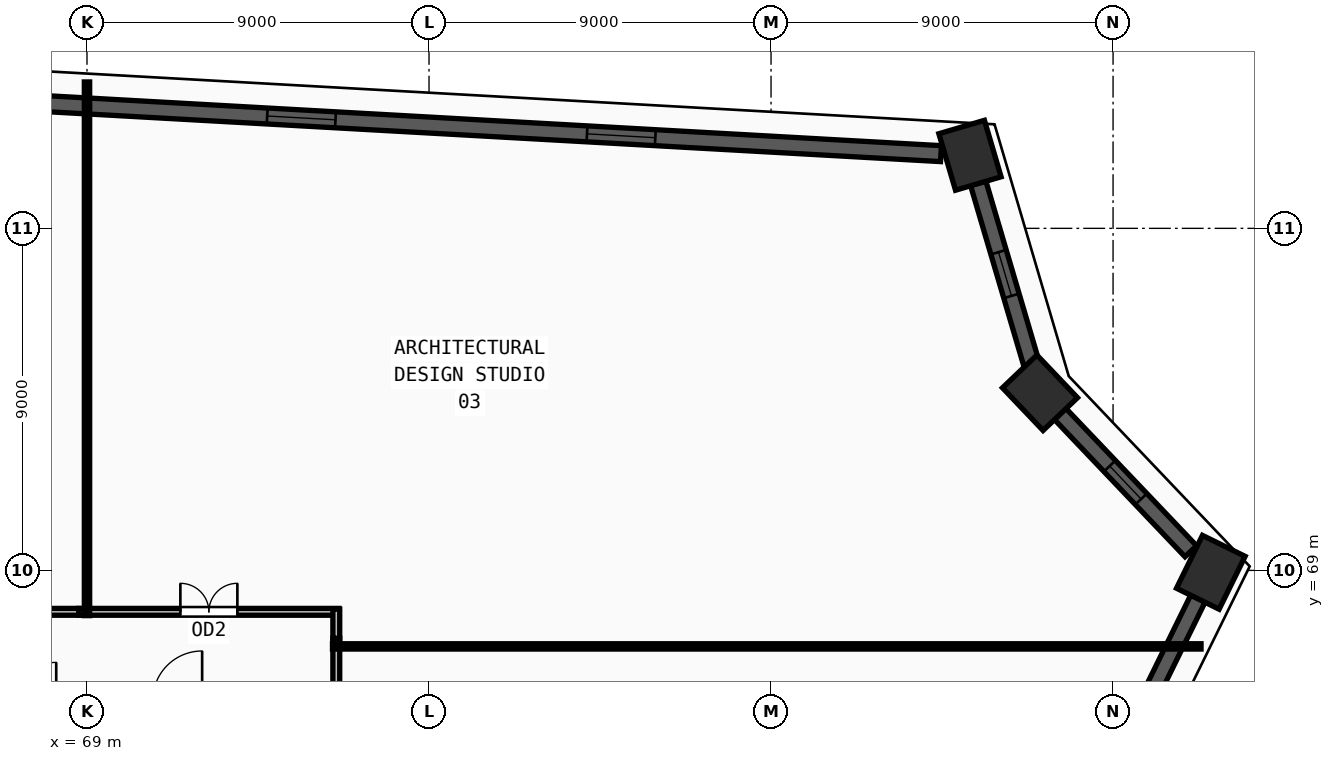
"""IFC4 building model, lengths in metres.
Left out: names, types, materials, properties, quantities, classifications, styles, units other than length and angle.
Written with IfcOpenShell. Run it as: python <this file> out.ifc"""

import sys

from ifc_helpers import new_model, si_unit, direction, frame, frame_2d, origin, origin_2d, place, context, subcontext, project, spatial, rectangle, extrude, source, transform, mapped, element, fill, save


model = new_model("IFC4")
c1 = context("Model", 3, precision=1e-05, world=origin(), true_north=direction((0.0, 1.0)))
c2 = subcontext(c1, "Body", "Model", "MODEL_VIEW")
j1 = project(units=[si_unit("LENGTHUNIT", "METRE"), si_unit("PLANEANGLEUNIT", "RADIAN")], contexts=[c1])
p1 = place(None, origin())
s1 = spatial("IfcSite", under=j1, at=p1, CompositionType="ELEMENT")
p2 = place(p1, origin())
s2 = spatial("IfcBuilding", under=s1, at=p2, CompositionType="ELEMENT")
p3 = place(p2, frame((0.0, 0.0, 51.75)))
s3 = spatial("IfcBuildingStorey", under=s2, at=p3, CompositionType="ELEMENT", Elevation=51.75)
m1 = source(origin(), c2, "Body", "SweptSolid", [
    extrude(rectangle(XDim=1.55, YDim=1.25, at=origin_2d()), origin(), (0.0, 0.0, 1.0), 3.75),
])
for number, where, z_axis, x_axis in (
    (1, (92.235, 79.923, 0.0), (0.0, 0.0, 1.0), (-0.283, 0.959, 0.0)),
    (2, (94.077, 73.674, 0.0), (0.0, 0.0, 1.0), (-0.689, 0.724, 0.0)),
    (3, (98.572, 68.95, 0.0), (0.0, 0.0, 1.0), (0.441, 0.897, 0.0)),
):
    element("IfcColumn", number, at=place(p3, frame(where, z_axis=z_axis, x_axis=x_axis)), inside=s3, PredefinedType="COLUMN", context=c2, shape_type="MappedRepresentation", body=[
        mapped(m1, transform((0.0, 0.0, 0.0), x_axis=(1.0, 0.0, 0.0), y_axis=(0.0, 1.0, 0.0), z_axis=(0.0, 0.0, 1.0), scale=1.0)),
    ])
p4 = place(p3, frame((85.967, 43.301, 0.0), z_axis=(0.0, 0.0, 1.0), x_axis=(0.441079786623, 0.897467894597, 0.0)))
e4 = element("IfcWall", 4, at=p4, inside=s3, PredefinedType="SOLIDWALL", context=c2, shape_type="SweptSolid", body=[
    extrude(rectangle(XDim=27.814, YDim=0.42, at=frame_2d((13.907, 0.0))), origin(), (0.0, 0.0, 1.0), 3.57),
])
m2 = source(origin(), c2, "Body", "SweptSolid", [
    extrude(rectangle(XDim=1.8, YDim=1.95, at=frame_2d((0.9, 0.975))), frame((0.0, 0.22, 0.0), z_axis=(0.0, -1.0, 0.0), x_axis=(1.0, 0.0, 0.0)), (0.0, 0.0, 1.0), 0.44),
])
p5 = place(p4, frame((6.053, 0.0, 0.55)))
e5 = element("IfcOpeningElement", 5, at=p5, cuts=e4, PredefinedType="OPENING", context=c2, shape_type="MappedRepresentation", body=[
    mapped(m2, transform((0.0, 0.0, 0.0), x_axis=(1.0, 0.0, 0.0), y_axis=(0.0, 1.0, 0.0), z_axis=(0.0, 0.0, 1.0), scale=1.0)),
])
p6 = place(p4, frame((14.557, 0.0, 0.55)))
e6 = element("IfcOpeningElement", 6, at=p6, cuts=e4, PredefinedType="OPENING", context=c2, shape_type="MappedRepresentation", body=[
    mapped(m2, transform((0.0, 0.0, 0.0), x_axis=(1.0, 0.0, 0.0), y_axis=(0.0, 1.0, 0.0), z_axis=(0.0, 0.0, 1.0), scale=1.0)),
])
p7 = place(p4, frame((19.11, 0.0, 0.55)))
e7 = element("IfcOpeningElement", 7, at=p7, cuts=e4, PredefinedType="OPENING", context=c2, shape_type="MappedRepresentation", body=[
    mapped(m2, transform((0.0, 0.0, 0.0), x_axis=(1.0, 0.0, 0.0), y_axis=(0.0, 1.0, 0.0), z_axis=(0.0, 0.0, 1.0), scale=1.0)),
])
p8 = place(p3, frame((98.045, 69.504, 0.0), z_axis=(0.0, 0.0, 1.0), x_axis=(-0.689330241698, 0.724447249895, 0.0)))
e8 = element("IfcWall", 8, at=p8, inside=s3, PredefinedType="SOLIDWALL", context=c2, shape_type="SweptSolid", body=[
    extrude(rectangle(XDim=4.992, YDim=0.42, at=frame_2d((2.496, 0.0))), origin(), (0.0, 0.0, 1.0), 3.57),
])
m3 = source(origin(), c2, "Body", "SweptSolid", [
    extrude(rectangle(XDim=1.2, YDim=1.9, at=frame_2d((0.6, 0.95))), frame((0.0, 0.22, 0.0), z_axis=(0.0, -1.0, 0.0), x_axis=(1.0, 0.0, 0.0)), (0.0, 0.0, 1.0), 0.44),
])
p9 = place(p8, frame((1.896, 0.0, 0.55)))
e9 = element("IfcOpeningElement", 9, at=p9, cuts=e8, PredefinedType="OPENING", context=c2, shape_type="MappedRepresentation", body=[
    mapped(m3, transform((0.0, 0.0, 0.0), x_axis=(1.0, 0.0, 0.0), y_axis=(0.0, 1.0, 0.0), z_axis=(0.0, 0.0, 1.0), scale=1.0)),
])
p10 = place(p3, frame((93.861, 74.408, 0.0), z_axis=(0.0, 0.0, 1.0), x_axis=(-0.282900765271, 0.959149183917, 0.0)))
e10 = element("IfcWall", 10, at=p10, inside=s3, PredefinedType="SOLIDWALL", context=c2, shape_type="SweptSolid", body=[
    extrude(rectangle(XDim=4.985, YDim=0.42, at=frame_2d((2.492, 0.0))), origin(), (0.0, 0.0, 1.0), 3.57),
])
p11 = place(p10, frame((1.892, 0.0, 0.55)))
e11 = element("IfcOpeningElement", 11, at=p11, cuts=e10, PredefinedType="OPENING", context=c2, shape_type="MappedRepresentation", body=[
    mapped(m3, transform((0.0, 0.0, 0.0), x_axis=(1.0, 0.0, 0.0), y_axis=(0.0, 1.0, 0.0), z_axis=(0.0, 0.0, 1.0), scale=1.0)),
])
p12 = place(p3, frame((91.471, 79.966, 0.0), z_axis=(0.0, 0.0, 1.0), x_axis=(-0.998444156387, 0.055760797854, 0.0)))
e12 = element("IfcWall", 12, at=p12, inside=s3, PredefinedType="SOLIDWALL", context=c2, shape_type="SweptSolid", body=[
    extrude(rectangle(XDim=33.713, YDim=0.42, at=frame_2d((16.857, 0.0))), origin(), (0.0, 0.0, 1.0), 3.57),
])
p13 = place(p12, frame((7.528, 0.0, 0.55)))
e13 = element("IfcOpeningElement", 13, at=p13, cuts=e12, PredefinedType="OPENING", context=c2, shape_type="MappedRepresentation", body=[
    mapped(m2, transform((0.0, 0.0, 0.0), x_axis=(1.0, 0.0, 0.0), y_axis=(0.0, 1.0, 0.0), z_axis=(0.0, 0.0, 1.0), scale=1.0)),
])
p14 = place(p12, frame((15.957, 0.0, 0.55)))
e14 = element("IfcOpeningElement", 14, at=p14, cuts=e12, PredefinedType="OPENING", context=c2, shape_type="MappedRepresentation", body=[
    mapped(m2, transform((0.0, 0.0, 0.0), x_axis=(1.0, 0.0, 0.0), y_axis=(0.0, 1.0, 0.0), z_axis=(0.0, 0.0, 1.0), scale=1.0)),
])
p15 = place(p12, frame((24.385, 0.0, 0.55)))
e15 = element("IfcOpeningElement", 15, at=p15, cuts=e12, PredefinedType="OPENING", context=c2, shape_type="MappedRepresentation", body=[
    mapped(m2, transform((0.0, 0.0, 0.0), x_axis=(1.0, 0.0, 0.0), y_axis=(0.0, 1.0, 0.0), z_axis=(0.0, 0.0, 1.0), scale=1.0)),
])
p16 = place(p3, frame((75.56, 67.215, 0.0), z_axis=(0.0, 0.0, 1.0), x_axis=(0.0, -1.0, 0.0)))
e16 = element("IfcWall", 16, at=p16, inside=s3, PredefinedType="PARTITIONING", context=c2, shape_type="SweptSolid", body=[
    extrude(rectangle(XDim=4.0, YDim=0.18, at=frame_2d((2.0, 0.0))), origin(), (0.0, 0.0, 1.0), 3.57),
])
m4 = source(origin(), c2, "Body", "SweptSolid", [
    extrude(rectangle(XDim=1.0, YDim=2.2, at=frame_2d((0.5, 1.1))), frame((0.0, 0.1, 0.0), z_axis=(0.0, -1.0, 0.0), x_axis=(1.0, 0.0, 0.0)), (0.0, 0.0, 1.0), 0.2),
])
p17 = place(p16, frame((1.5, 0.0, 0.0)))
e17 = element("IfcOpeningElement", 17, at=p17, cuts=e16, PredefinedType="OPENING", context=c2, shape_type="MappedRepresentation", body=[
    mapped(m4, transform((0.0, 0.0, 0.0), x_axis=(1.0, 0.0, 0.0), y_axis=(0.0, 1.0, 0.0), z_axis=(0.0, 0.0, 1.0), scale=1.0)),
])
p18 = place(p3, frame((68.785, 67.91, 0.0), z_axis=(0.0, 0.0, 1.0), x_axis=(1.0, 0.0, 0.0)))
e18 = element("IfcWall", 18, at=p18, inside=s3, PredefinedType="PARTITIONING", context=c2, shape_type="SweptSolid", body=[
    extrude(rectangle(XDim=6.845, YDim=0.18, at=frame_2d((3.422, 0.0))), origin(), (0.0, 0.0, 1.0), 3.57),
])
m5 = source(origin(), c2, "Body", "SweptSolid", [
    extrude(rectangle(XDim=1.5, YDim=2.2, at=frame_2d((0.75, 1.1))), frame((0.0, 0.1, 0.0), z_axis=(0.0, -1.0, 0.0), x_axis=(1.0, 0.0, 0.0)), (0.0, 0.0, 1.0), 0.2),
])
p19 = place(p18, frame((2.672, 0.0, 0.0)))
e19 = element("IfcOpeningElement", 19, at=p19, cuts=e18, PredefinedType="OPENING", context=c2, shape_type="MappedRepresentation", body=[
    mapped(m5, transform((0.0, 0.0, 0.0), x_axis=(1.0, 0.0, 0.0), y_axis=(0.0, 1.0, 0.0), z_axis=(0.0, 0.0, 1.0), scale=1.0)),
])
p20 = place(p3, frame((60.785, 67.91, 0.0), z_axis=(0.0, 0.0, 1.0), x_axis=(1.0, 0.0, 0.0)))
e20 = element("IfcWall", 20, at=p20, inside=s3, PredefinedType="PARTITIONING", context=c2, shape_type="SweptSolid", body=[
    extrude(rectangle(XDim=8.0, YDim=0.18, at=frame_2d((4.0, 0.0))), origin(), (0.0, 0.0, 1.0), 3.57),
])
p21 = place(p20, frame((3.5, 0.0, 0.0)))
e21 = element("IfcOpeningElement", 21, at=p21, cuts=e20, PredefinedType="OPENING", context=c2, shape_type="MappedRepresentation", body=[
    mapped(m4, transform((0.0, 0.0, 0.0), x_axis=(1.0, 0.0, 0.0), y_axis=(0.0, 1.0, 0.0), z_axis=(0.0, 0.0, 1.0), scale=1.0)),
])
p22 = place(p3, frame((75.56, 67.98, 0.0), z_axis=(0.0, 0.0, 1.0), x_axis=(0.0, -1.0, 0.0)))
e22 = element("IfcWall", 22, at=p22, inside=s3, PredefinedType="PARTITIONING", context=c2, shape_type="SweptSolid", body=[
    extrude(rectangle(XDim=0.765, YDim=0.18, at=frame_2d((0.382, 0.0))), origin(), (0.0, 0.0, 1.0), 3.57),
])
p23 = place(p3, frame((75.46, 67.0, 0.0), z_axis=(0.0, 0.0, 1.0), x_axis=(1.0, 0.0, 0.0)))
e23 = element("IfcWall", 23, at=p23, inside=s3, PredefinedType="PARTITIONING", context=c2, shape_type="SweptSolid", body=[
    extrude(rectangle(XDim=22.855, YDim=0.14, at=frame_2d((11.427, 0.0))), origin(), (0.0, 0.0, 1.0), 2.655),
])
p24 = place(p3, frame((69.0, 67.81, 0.0), z_axis=(0.0, 0.0, 1.0), x_axis=(0.0, 1.0, 0.0)))
e24 = element("IfcWall", 24, at=p24, inside=s3, PredefinedType="PARTITIONING", context=c2, shape_type="SweptSolid", body=[
    extrude(rectangle(XDim=14.042, YDim=0.14, at=frame_2d((7.021, 0.0))), origin(), (0.0, 0.0, 1.0), 3.57),
])
m6 = source(origin(), c2, "Body", "SweptSolid", [
    extrude(rectangle(XDim=1.2, YDim=1.9, at=frame_2d((0.6, 0.95))), frame((0.0, 0.03, 0.0), z_axis=(0.0, -1.0, 0.0), x_axis=(1.0, 0.0, 0.0)), (0.0, 0.0, 1.0), 0.06),
])
p25 = place(p9, origin())
e25 = element("IfcWindow", 25, at=p25, inside=s3, PartitioningType="SINGLE_PANEL", PredefinedType="WINDOW", context=c2, shape_type="MappedRepresentation", body=[
    mapped(m6, transform((0.0, 0.0, 0.0), x_axis=(1.0, 0.0, 0.0), y_axis=(0.0, 1.0, 0.0), z_axis=(0.0, 0.0, 1.0), scale=1.0)),
])
fill(e9, e25)
p26 = place(p11, origin())
e26 = element("IfcWindow", 26, at=p26, inside=s3, PartitioningType="SINGLE_PANEL", PredefinedType="WINDOW", context=c2, shape_type="MappedRepresentation", body=[
    mapped(m6, transform((0.0, 0.0, 0.0), x_axis=(1.0, 0.0, 0.0), y_axis=(0.0, 1.0, 0.0), z_axis=(0.0, 0.0, 1.0), scale=1.0)),
])
fill(e11, e26)
m7 = source(origin(), c2, "Body", "SweptSolid", [
    extrude(rectangle(XDim=1.8, YDim=1.95, at=frame_2d((0.9, 0.975))), frame((0.0, 0.03, 0.0), z_axis=(0.0, -1.0, 0.0), x_axis=(1.0, 0.0, 0.0)), (0.0, 0.0, 1.0), 0.06),
])
p27 = place(p13, origin())
e27 = element("IfcWindow", 27, at=p27, inside=s3, PartitioningType="DOUBLE_PANEL_VERTICAL", PredefinedType="WINDOW", context=c2, shape_type="MappedRepresentation", body=[
    mapped(m7, transform((0.0, 0.0, 0.0), x_axis=(1.0, 0.0, 0.0), y_axis=(0.0, 1.0, 0.0), z_axis=(0.0, 0.0, 1.0), scale=1.0)),
])
fill(e13, e27)
p28 = place(p14, origin())
e28 = element("IfcWindow", 28, at=p28, inside=s3, PartitioningType="DOUBLE_PANEL_VERTICAL", PredefinedType="WINDOW", context=c2, shape_type="MappedRepresentation", body=[
    mapped(m7, transform((0.0, 0.0, 0.0), x_axis=(1.0, 0.0, 0.0), y_axis=(0.0, 1.0, 0.0), z_axis=(0.0, 0.0, 1.0), scale=1.0)),
])
fill(e14, e28)
m8 = source(origin(), c2, "Body", "SweptSolid", [
    extrude(rectangle(XDim=1.5, YDim=2.2, at=frame_2d((0.75, 1.1))), frame((0.0, 0.025, 0.0), z_axis=(0.0, -1.0, 0.0), x_axis=(1.0, 0.0, 0.0)), (0.0, 0.0, 1.0), 0.05),
])
p29 = place(p19, origin())
e29 = element("IfcDoor", 29, at=p29, inside=s3, OperationType="DOUBLE_DOOR_SINGLE_SWING", PredefinedType="DOOR", context=c2, shape_type="MappedRepresentation", body=[
    mapped(m8, transform((0.0, 0.0, 0.0), x_axis=(1.0, 0.0, 0.0), y_axis=(0.0, 1.0, 0.0), z_axis=(0.0, 0.0, 1.0), scale=1.0)),
])
fill(e19, e29)
save(model, sys.argv[1])
